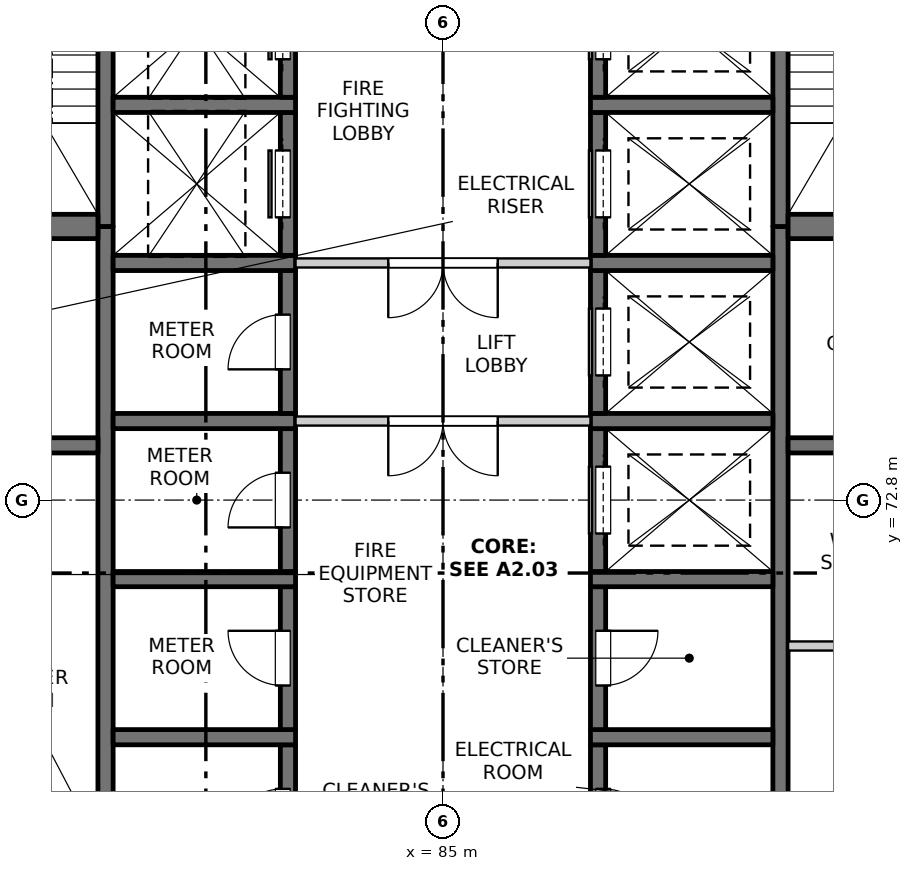
"""IFC4 building model, lengths in metres.
Left out: names, types, materials, properties, quantities, classifications, styles, units other than length and angle.
Written with IfcOpenShell. Run it as: python <this file> out.ifc"""

import sys

from ifc_helpers import new_model, si_unit, direction, frame, frame_2d, origin, place, context, subcontext, project, spatial, rectangle, extrude, element, fill, save


model = new_model("IFC4")
c1 = context("Model", 3, precision=1e-05, world=origin(), true_north=direction((0.0, 1.0)))
c2 = subcontext(c1, "Body", "Model", "MODEL_VIEW")
j1 = project(units=[si_unit("LENGTHUNIT", "METRE"), si_unit("PLANEANGLEUNIT", "RADIAN")], contexts=[c1])
p1 = place(None, origin())
s1 = spatial("IfcSite", under=j1, at=p1, CompositionType="ELEMENT")
p2 = place(p1, origin())
s2 = spatial("IfcBuilding", under=s1, at=p2, CompositionType="ELEMENT")
p3 = place(p2, frame((0.0, 0.0, 210.9)))
s3 = spatial("IfcBuildingStorey", under=s2, at=p3, CompositionType="ELEMENT", Elevation=210.9)
p4 = place(p3, frame((79.45, 60.975, -0.25), z_axis=(0.0, 0.0, 1.0), x_axis=(0.0, 1.0, 0.0)))
e1 = element("IfcWall", 1, at=p4, inside=s3, PredefinedType="SOLIDWALL", context=c2, shape_type="SweptSolid", body=[
    extrude(rectangle(XDim=16.325, YDim=0.25, at=frame_2d((8.163, 0.0))), origin(), (0.0, 0.0, 1.0), 3.4),
])
p5 = place(p3, frame((79.45, 77.3, -0.25), z_axis=(0.0, 0.0, 1.0), x_axis=(0.0, 1.0, 0.0)))
e2 = element("IfcWall", 2, at=p5, inside=s3, PredefinedType="SOLIDWALL", context=c2, shape_type="SweptSolid", body=[
    extrude(rectangle(XDim=7.0, YDim=0.25, at=frame_2d((3.5, 0.0))), origin(), (0.0, 0.0, 1.0), 3.4),
])
p6 = place(p3, frame((90.55, 61.95, -0.25), z_axis=(0.0, 0.0, 1.0), x_axis=(0.0, 1.0, 0.0)))
e3 = element("IfcWall", 3, at=p6, inside=s3, PredefinedType="SOLIDWALL", context=c2, shape_type="SweptSolid", body=[
    extrude(rectangle(XDim=15.35, YDim=0.25, at=frame_2d((7.675, 0.0))), origin(), (0.0, 0.0, 1.0), 3.4),
])
p7 = place(p3, frame((90.55, 77.3, -0.25), z_axis=(0.0, 0.0, 1.0), x_axis=(0.0, 1.0, 0.0)))
e4 = element("IfcWall", 4, at=p7, inside=s3, PredefinedType="SOLIDWALL", context=c2, shape_type="SweptSolid", body=[
    extrude(rectangle(XDim=7.0, YDim=0.25, at=frame_2d((3.5, 0.0))), origin(), (0.0, 0.0, 1.0), 3.4),
])
p8 = place(p3, frame((82.45, 66.425, -0.25), z_axis=(0.0, 0.0, 1.0), x_axis=(0.0, 1.0, 0.0)))
e5 = element("IfcWall", 5, at=p8, inside=s3, PredefinedType="SOLIDWALL", context=c2, shape_type="SweptSolid", body=[
    extrude(rectangle(XDim=2.35, YDim=0.25, at=frame_2d((1.175, 0.0))), origin(), (0.0, 0.0, 1.0), 3.4),
])
p9 = place(p8, frame((0.725, 0.0, 0.25)))
e6 = element("IfcOpeningElement", 6, at=p9, cuts=e5, PredefinedType="OPENING", context=c2, shape_type="SweptSolid", body=[
    extrude(rectangle(XDim=0.9, YDim=2.1, at=frame_2d((0.45, 1.05))), frame((0.0, 0.135, 0.0), z_axis=(0.0, -1.0, 0.0), x_axis=(1.0, 0.0, 0.0)), (0.0, 0.0, 1.0), 0.27),
])
p10 = place(p3, frame((79.575, 68.9, -0.25), z_axis=(0.0, 0.0, 1.0), x_axis=(1.0, 0.0, 0.0)))
e7 = element("IfcWall", 7, at=p10, inside=s3, PredefinedType="SOLIDWALL", context=c2, shape_type="SweptSolid", body=[
    extrude(rectangle(XDim=3.0, YDim=0.25, at=frame_2d((1.5, 0.0))), origin(), (0.0, 0.0, 1.0), 3.4),
])
p11 = place(p3, frame((82.45, 69.025, -0.25), z_axis=(0.0, 0.0, 1.0), x_axis=(0.0, 1.0, 0.0)))
e8 = element("IfcWall", 8, at=p11, inside=s3, PredefinedType="SOLIDWALL", context=c2, shape_type="SweptSolid", body=[
    extrude(rectangle(XDim=2.35, YDim=0.25, at=frame_2d((1.175, 0.0))), origin(), (0.0, 0.0, 1.0), 3.4),
])
p12 = place(p11, frame((0.725, 0.0, 0.25)))
e9 = element("IfcOpeningElement", 9, at=p12, cuts=e8, PredefinedType="OPENING", context=c2, shape_type="SweptSolid", body=[
    extrude(rectangle(XDim=0.9, YDim=2.1, at=frame_2d((0.45, 1.05))), frame((0.0, 0.135, 0.0), z_axis=(0.0, -1.0, 0.0), x_axis=(1.0, 0.0, 0.0)), (0.0, 0.0, 1.0), 0.27),
])
p13 = place(p3, frame((79.575, 71.5, -0.25), z_axis=(0.0, 0.0, 1.0), x_axis=(1.0, 0.0, 0.0)))
e10 = element("IfcWall", 10, at=p13, inside=s3, PredefinedType="SOLIDWALL", context=c2, shape_type="SweptSolid", body=[
    extrude(rectangle(XDim=3.0, YDim=0.25, at=frame_2d((1.5, 0.0))), origin(), (0.0, 0.0, 1.0), 3.4),
])
p14 = place(p3, frame((82.45, 71.625, -0.25), z_axis=(0.0, 0.0, 1.0), x_axis=(0.0, 1.0, 0.0)))
e11 = element("IfcWall", 11, at=p14, inside=s3, PredefinedType="SOLIDWALL", context=c2, shape_type="SweptSolid", body=[
    extrude(rectangle(XDim=2.35, YDim=0.25, at=frame_2d((1.175, 0.0))), origin(), (0.0, 0.0, 1.0), 3.4),
])
p15 = place(p14, frame((0.725, 0.0, 0.25)))
e12 = element("IfcOpeningElement", 12, at=p15, cuts=e11, PredefinedType="OPENING", context=c2, shape_type="SweptSolid", body=[
    extrude(rectangle(XDim=0.9, YDim=2.1, at=frame_2d((0.45, 1.05))), frame((0.0, 0.135, 0.0), z_axis=(0.0, -1.0, 0.0), x_axis=(1.0, 0.0, 0.0)), (0.0, 0.0, 1.0), 0.27),
])
p16 = place(p3, frame((79.575, 74.1, -0.25), z_axis=(0.0, 0.0, 1.0), x_axis=(1.0, 0.0, 0.0)))
e13 = element("IfcWall", 13, at=p16, inside=s3, PredefinedType="SOLIDWALL", context=c2, shape_type="SweptSolid", body=[
    extrude(rectangle(XDim=3.0, YDim=0.25, at=frame_2d((1.5, 0.0))), origin(), (0.0, 0.0, 1.0), 3.4),
])
p17 = place(p3, frame((82.45, 74.225, -0.25), z_axis=(0.0, 0.0, 1.0), x_axis=(0.0, 1.0, 0.0)))
e14 = element("IfcWall", 14, at=p17, inside=s3, PredefinedType="SOLIDWALL", context=c2, shape_type="SweptSolid", body=[
    extrude(rectangle(XDim=2.35, YDim=0.25, at=frame_2d((1.175, 0.0))), origin(), (0.0, 0.0, 1.0), 3.4),
])
p18 = place(p17, frame((0.725, 0.0, 0.25)))
e15 = element("IfcOpeningElement", 15, at=p18, cuts=e14, PredefinedType="OPENING", context=c2, shape_type="SweptSolid", body=[
    extrude(rectangle(XDim=0.9, YDim=2.1, at=frame_2d((0.45, 1.05))), frame((0.0, 0.135, 0.0), z_axis=(0.0, -1.0, 0.0), x_axis=(1.0, 0.0, 0.0)), (0.0, 0.0, 1.0), 0.27),
])
p19 = place(p3, frame((79.575, 76.7, -0.25), z_axis=(0.0, 0.0, 1.0), x_axis=(1.0, 0.0, 0.0)))
e16 = element("IfcWall", 16, at=p19, inside=s3, PredefinedType="SOLIDWALL", context=c2, shape_type="SweptSolid", body=[
    extrude(rectangle(XDim=3.0, YDim=0.25, at=frame_2d((1.5, 0.0))), origin(), (0.0, 0.0, 1.0), 3.4),
])
p20 = place(p3, frame((82.45, 76.825, -0.25), z_axis=(0.0, 0.0, 1.0), x_axis=(0.0, 1.0, 0.0)))
e17 = element("IfcWall", 17, at=p20, inside=s3, PredefinedType="SOLIDWALL", context=c2, shape_type="SweptSolid", body=[
    extrude(rectangle(XDim=2.35, YDim=0.25, at=frame_2d((1.175, 0.0))), origin(), (0.0, 0.0, 1.0), 3.4),
])
p21 = place(p20, frame((0.625, 0.0, 0.25)))
e18 = element("IfcOpeningElement", 18, at=p21, cuts=e17, PredefinedType="OPENING", context=c2, shape_type="SweptSolid", body=[
    extrude(rectangle(XDim=1.1, YDim=2.1, at=frame_2d((0.55, 1.05))), frame((0.0, 0.135, 0.0), z_axis=(0.0, -1.0, 0.0), x_axis=(1.0, 0.0, 0.0)), (0.0, 0.0, 1.0), 0.27),
])
p22 = place(p3, frame((79.575, 79.3, -0.25), z_axis=(0.0, 0.0, 1.0), x_axis=(1.0, 0.0, 0.0)))
e19 = element("IfcWall", 19, at=p22, inside=s3, PredefinedType="SOLIDWALL", context=c2, shape_type="SweptSolid", body=[
    extrude(rectangle(XDim=3.0, YDim=0.25, at=frame_2d((1.5, 0.0))), origin(), (0.0, 0.0, 1.0), 3.4),
])
p23 = place(p3, frame((82.45, 79.425, -0.25), z_axis=(0.0, 0.0, 1.0), x_axis=(0.0, 1.0, 0.0)))
e20 = element("IfcWall", 20, at=p23, inside=s3, PredefinedType="SOLIDWALL", context=c2, shape_type="SweptSolid", body=[
    extrude(rectangle(XDim=2.35, YDim=0.25, at=frame_2d((1.175, 0.0))), origin(), (0.0, 0.0, 1.0), 3.4),
])
p24 = place(p23, frame((0.625, 0.0, 0.25)))
e21 = element("IfcOpeningElement", 21, at=p24, cuts=e20, PredefinedType="OPENING", context=c2, shape_type="SweptSolid", body=[
    extrude(rectangle(XDim=1.1, YDim=2.1, at=frame_2d((0.55, 1.05))), frame((0.0, 0.135, 0.0), z_axis=(0.0, -1.0, 0.0), x_axis=(1.0, 0.0, 0.0)), (0.0, 0.0, 1.0), 0.27),
])
p25 = place(p3, frame((87.55, 66.425, -0.25), z_axis=(0.0, 0.0, 1.0), x_axis=(0.0, 1.0, 0.0)))
e22 = element("IfcWall", 22, at=p25, inside=s3, PredefinedType="SOLIDWALL", context=c2, shape_type="SweptSolid", body=[
    extrude(rectangle(XDim=2.35, YDim=0.25, at=frame_2d((1.175, 0.0))), origin(), (0.0, 0.0, 1.0), 3.4),
])
p26 = place(p25, frame((0.725, 0.0, 0.25)))
e23 = element("IfcOpeningElement", 23, at=p26, cuts=e22, PredefinedType="OPENING", context=c2, shape_type="SweptSolid", body=[
    extrude(rectangle(XDim=0.9, YDim=2.1, at=frame_2d((0.45, 1.05))), frame((0.0, 0.135, 0.0), z_axis=(0.0, -1.0, 0.0), x_axis=(1.0, 0.0, 0.0)), (0.0, 0.0, 1.0), 0.27),
])
p27 = place(p3, frame((87.425, 68.9, -0.25), z_axis=(0.0, 0.0, 1.0), x_axis=(1.0, 0.0, 0.0)))
e24 = element("IfcWall", 24, at=p27, inside=s3, PredefinedType="SOLIDWALL", context=c2, shape_type="SweptSolid", body=[
    extrude(rectangle(XDim=3.0, YDim=0.25, at=frame_2d((1.5, 0.0))), origin(), (0.0, 0.0, 1.0), 3.4),
])
p28 = place(p3, frame((87.55, 69.025, -0.25), z_axis=(0.0, 0.0, 1.0), x_axis=(0.0, 1.0, 0.0)))
e25 = element("IfcWall", 25, at=p28, inside=s3, PredefinedType="SOLIDWALL", context=c2, shape_type="SweptSolid", body=[
    extrude(rectangle(XDim=2.35, YDim=0.25, at=frame_2d((1.175, 0.0))), origin(), (0.0, 0.0, 1.0), 3.4),
])
p29 = place(p28, frame((0.725, 0.0, 0.25)))
e26 = element("IfcOpeningElement", 26, at=p29, cuts=e25, PredefinedType="OPENING", context=c2, shape_type="SweptSolid", body=[
    extrude(rectangle(XDim=0.9, YDim=2.1, at=frame_2d((0.45, 1.05))), frame((0.0, 0.135, 0.0), z_axis=(0.0, -1.0, 0.0), x_axis=(1.0, 0.0, 0.0)), (0.0, 0.0, 1.0), 0.27),
])
p30 = place(p3, frame((87.425, 71.5, -0.25), z_axis=(0.0, 0.0, 1.0), x_axis=(1.0, 0.0, 0.0)))
e27 = element("IfcWall", 27, at=p30, inside=s3, PredefinedType="SOLIDWALL", context=c2, shape_type="SweptSolid", body=[
    extrude(rectangle(XDim=3.0, YDim=0.25, at=frame_2d((1.5, 0.0))), origin(), (0.0, 0.0, 1.0), 3.4),
])
p31 = place(p3, frame((87.55, 71.625, -0.25), z_axis=(0.0, 0.0, 1.0), x_axis=(0.0, 1.0, 0.0)))
e28 = element("IfcWall", 28, at=p31, inside=s3, PredefinedType="SOLIDWALL", context=c2, shape_type="SweptSolid", body=[
    extrude(rectangle(XDim=2.35, YDim=0.25, at=frame_2d((1.175, 0.0))), origin(), (0.0, 0.0, 1.0), 3.4),
])
p32 = place(p31, frame((0.625, 0.0, 0.25)))
e29 = element("IfcOpeningElement", 29, at=p32, cuts=e28, PredefinedType="OPENING", context=c2, shape_type="SweptSolid", body=[
    extrude(rectangle(XDim=1.1, YDim=2.1, at=frame_2d((0.55, 1.05))), frame((0.0, 0.135, 0.0), z_axis=(0.0, -1.0, 0.0), x_axis=(1.0, 0.0, 0.0)), (0.0, 0.0, 1.0), 0.27),
])
p33 = place(p3, frame((87.425, 74.1, -0.25), z_axis=(0.0, 0.0, 1.0), x_axis=(1.0, 0.0, 0.0)))
e30 = element("IfcWall", 30, at=p33, inside=s3, PredefinedType="SOLIDWALL", context=c2, shape_type="SweptSolid", body=[
    extrude(rectangle(XDim=3.0, YDim=0.25, at=frame_2d((1.5, 0.0))), origin(), (0.0, 0.0, 1.0), 3.4),
])
p34 = place(p3, frame((87.55, 74.225, -0.25), z_axis=(0.0, 0.0, 1.0), x_axis=(0.0, 1.0, 0.0)))
e31 = element("IfcWall", 31, at=p34, inside=s3, PredefinedType="SOLIDWALL", context=c2, shape_type="SweptSolid", body=[
    extrude(rectangle(XDim=2.35, YDim=0.25, at=frame_2d((1.175, 0.0))), origin(), (0.0, 0.0, 1.0), 3.4),
])
p35 = place(p34, frame((0.625, 0.0, 0.25)))
e32 = element("IfcOpeningElement", 32, at=p35, cuts=e31, PredefinedType="OPENING", context=c2, shape_type="SweptSolid", body=[
    extrude(rectangle(XDim=1.1, YDim=2.1, at=frame_2d((0.55, 1.05))), frame((0.0, 0.135, 0.0), z_axis=(0.0, -1.0, 0.0), x_axis=(1.0, 0.0, 0.0)), (0.0, 0.0, 1.0), 0.27),
])
p36 = place(p3, frame((87.425, 76.7, -0.25), z_axis=(0.0, 0.0, 1.0), x_axis=(1.0, 0.0, 0.0)))
e33 = element("IfcWall", 33, at=p36, inside=s3, PredefinedType="SOLIDWALL", context=c2, shape_type="SweptSolid", body=[
    extrude(rectangle(XDim=3.0, YDim=0.25, at=frame_2d((1.5, 0.0))), origin(), (0.0, 0.0, 1.0), 3.4),
])
p37 = place(p3, frame((87.55, 76.825, -0.25), z_axis=(0.0, 0.0, 1.0), x_axis=(0.0, 1.0, 0.0)))
e34 = element("IfcWall", 34, at=p37, inside=s3, PredefinedType="SOLIDWALL", context=c2, shape_type="SweptSolid", body=[
    extrude(rectangle(XDim=2.35, YDim=0.25, at=frame_2d((1.175, 0.0))), origin(), (0.0, 0.0, 1.0), 3.4),
])
p38 = place(p37, frame((0.625, 0.0, 0.25)))
e35 = element("IfcOpeningElement", 35, at=p38, cuts=e34, PredefinedType="OPENING", context=c2, shape_type="SweptSolid", body=[
    extrude(rectangle(XDim=1.1, YDim=2.1, at=frame_2d((0.55, 1.05))), frame((0.0, 0.135, 0.0), z_axis=(0.0, -1.0, 0.0), x_axis=(1.0, 0.0, 0.0)), (0.0, 0.0, 1.0), 0.27),
])
p39 = place(p3, frame((87.425, 79.3, -0.25), z_axis=(0.0, 0.0, 1.0), x_axis=(1.0, 0.0, 0.0)))
e36 = element("IfcWall", 36, at=p39, inside=s3, PredefinedType="SOLIDWALL", context=c2, shape_type="SweptSolid", body=[
    extrude(rectangle(XDim=3.0, YDim=0.25, at=frame_2d((1.5, 0.0))), origin(), (0.0, 0.0, 1.0), 3.4),
])
p40 = place(p3, frame((87.55, 79.425, -0.25), z_axis=(0.0, 0.0, 1.0), x_axis=(0.0, 1.0, 0.0)))
e37 = element("IfcWall", 37, at=p40, inside=s3, PredefinedType="SOLIDWALL", context=c2, shape_type="SweptSolid", body=[
    extrude(rectangle(XDim=2.35, YDim=0.25, at=frame_2d((1.175, 0.0))), origin(), (0.0, 0.0, 1.0), 3.4),
])
p41 = place(p40, frame((0.625, 0.0, 0.25)))
e38 = element("IfcOpeningElement", 38, at=p41, cuts=e37, PredefinedType="OPENING", context=c2, shape_type="SweptSolid", body=[
    extrude(rectangle(XDim=1.1, YDim=2.1, at=frame_2d((0.55, 1.05))), frame((0.0, 0.135, 0.0), z_axis=(0.0, -1.0, 0.0), x_axis=(1.0, 0.0, 0.0)), (0.0, 0.0, 1.0), 0.27),
])
p42 = place(p3, frame((75.45, 73.7, -0.25), z_axis=(0.0, 0.0, 1.0), x_axis=(1.0, 0.0, 0.0)))
e39 = element("IfcWall", 39, at=p42, inside=s3, PredefinedType="SOLIDWALL", context=c2, shape_type="SweptSolid", body=[
    extrude(rectangle(XDim=3.875, YDim=0.25, at=frame_2d((1.938, 0.0))), origin(), (0.0, 0.0, 1.0), 3.4),
])
p43 = place(p3, frame((75.45, 77.3, -0.25), z_axis=(0.0, 0.0, 1.0), x_axis=(1.0, 0.0, 0.0)))
e40 = element("IfcWall", 40, at=p43, inside=s3, PredefinedType="SOLIDWALL", context=c2, shape_type="SweptSolid", body=[
    extrude(rectangle(XDim=3.875, YDim=0.4, at=frame_2d((1.938, 0.0))), origin(), (0.0, 0.0, 1.0), 3.4),
])
p44 = place(p3, frame((90.675, 73.7, -0.25), z_axis=(0.0, 0.0, 1.0), x_axis=(1.0, 0.0, 0.0)))
e41 = element("IfcWall", 41, at=p44, inside=s3, PredefinedType="SOLIDWALL", context=c2, shape_type="SweptSolid", body=[
    extrude(rectangle(XDim=3.875, YDim=0.25, at=frame_2d((1.938, 0.0))), origin(), (0.0, 0.0, 1.0), 3.4),
])
p45 = place(p3, frame((90.675, 77.3, -0.25), z_axis=(0.0, 0.0, 1.0), x_axis=(1.0, 0.0, 0.0)))
e42 = element("IfcWall", 42, at=p45, inside=s3, PredefinedType="SOLIDWALL", context=c2, shape_type="SweptSolid", body=[
    extrude(rectangle(XDim=3.875, YDim=0.4, at=frame_2d((1.938, 0.0))), origin(), (0.0, 0.0, 1.0), 3.4),
])
p46 = place(p3, frame((90.675, 70.4, 0.0), z_axis=(0.0, 0.0, 1.0), x_axis=(1.0, 0.0, 0.0)))
e43 = element("IfcWall", 43, at=p46, inside=s3, PredefinedType="PARTITIONING", context=c2, shape_type="SweptSolid", body=[
    extrude(rectangle(XDim=3.875, YDim=0.15, at=frame_2d((1.938, 0.0))), origin(), (0.0, 0.0, 1.0), 3.15),
])
p47 = place(p3, frame((82.575, 74.1, 0.0), z_axis=(0.0, 0.0, 1.0), x_axis=(1.0, 0.0, 0.0)))
e44 = element("IfcWall", 44, at=p47, inside=s3, PredefinedType="PARTITIONING", context=c2, shape_type="SweptSolid", body=[
    extrude(rectangle(XDim=4.85, YDim=0.15, at=frame_2d((2.425, 0.0))), origin(), (0.0, 0.0, 1.0), 3.15),
])
p48 = place(p47, frame((1.525, 0.0, 0.0)))
e45 = element("IfcOpeningElement", 45, at=p48, cuts=e44, PredefinedType="OPENING", context=c2, shape_type="SweptSolid", body=[
    extrude(rectangle(XDim=1.8, YDim=2.1, at=frame_2d((0.9, 1.05))), frame((0.0, 0.085, 0.0), z_axis=(0.0, -1.0, 0.0), x_axis=(1.0, 0.0, 0.0)), (0.0, 0.0, 1.0), 0.17),
])
p49 = place(p3, frame((82.575, 76.7, 0.0), z_axis=(0.0, 0.0, 1.0), x_axis=(1.0, 0.0, 0.0)))
e46 = element("IfcWall", 46, at=p49, inside=s3, PredefinedType="PARTITIONING", context=c2, shape_type="SweptSolid", body=[
    extrude(rectangle(XDim=4.85, YDim=0.15, at=frame_2d((2.425, 0.0))), origin(), (0.0, 0.0, 1.0), 3.15),
])
p50 = place(p49, frame((1.525, 0.0, 0.0)))
e47 = element("IfcOpeningElement", 47, at=p50, cuts=e46, PredefinedType="OPENING", context=c2, shape_type="SweptSolid", body=[
    extrude(rectangle(XDim=1.8, YDim=2.1, at=frame_2d((0.9, 1.05))), frame((0.0, 0.085, 0.0), z_axis=(0.0, -1.0, 0.0), x_axis=(1.0, 0.0, 0.0)), (0.0, 0.0, 1.0), 0.17),
])
p51 = place(p9, origin())
e48 = element("IfcDoor", 48, at=p51, inside=s3, OperationType="SINGLE_SWING_LEFT", PredefinedType="DOOR", context=c2, shape_type="SweptSolid", body=[
    extrude(rectangle(XDim=0.9, YDim=2.1, at=frame_2d((0.45, 1.05))), frame((0.0, 0.11, 0.0), z_axis=(0.0, -1.0, 0.0), x_axis=(1.0, 0.0, 0.0)), (0.0, 0.0, 1.0), 0.05),
])
fill(e6, e48)
p52 = place(p26, origin())
e49 = element("IfcDoor", 49, at=p52, inside=s3, OperationType="SINGLE_SWING_RIGHT", PredefinedType="DOOR", context=c2, shape_type="SweptSolid", body=[
    extrude(rectangle(XDim=0.9, YDim=2.1, at=frame_2d((0.45, 1.05))), frame((0.0, -0.06, 0.0), z_axis=(0.0, -1.0, 0.0), x_axis=(1.0, 0.0, 0.0)), (0.0, 0.0, 1.0), 0.05),
])
fill(e23, e49)
p53 = place(p12, origin())
e50 = element("IfcDoor", 50, at=p53, inside=s3, OperationType="SINGLE_SWING_RIGHT", PredefinedType="DOOR", context=c2, shape_type="SweptSolid", body=[
    extrude(rectangle(XDim=0.9, YDim=2.1, at=frame_2d((0.45, 1.05))), frame((0.0, 0.11, 0.0), z_axis=(0.0, -1.0, 0.0), x_axis=(1.0, 0.0, 0.0)), (0.0, 0.0, 1.0), 0.05),
])
fill(e9, e50)
p54 = place(p29, origin())
e51 = element("IfcDoor", 51, at=p54, inside=s3, OperationType="SINGLE_SWING_LEFT", PredefinedType="DOOR", context=c2, shape_type="SweptSolid", body=[
    extrude(rectangle(XDim=0.9, YDim=2.1, at=frame_2d((0.45, 1.05))), frame((0.0, -0.06, 0.0), z_axis=(0.0, -1.0, 0.0), x_axis=(1.0, 0.0, 0.0)), (0.0, 0.0, 1.0), 0.05),
])
fill(e26, e51)
p55 = place(p15, origin())
e52 = element("IfcDoor", 52, at=p55, inside=s3, OperationType="SINGLE_SWING_LEFT", PredefinedType="DOOR", context=c2, shape_type="SweptSolid", body=[
    extrude(rectangle(XDim=0.9, YDim=2.1, at=frame_2d((0.45, 1.05))), frame((0.0, 0.11, 0.0), z_axis=(0.0, -1.0, 0.0), x_axis=(1.0, 0.0, 0.0)), (0.0, 0.0, 1.0), 0.05),
])
fill(e12, e52)
p56 = place(p32, origin())
e53 = element("IfcDoor", 53, at=p56, inside=s3, OperationType="SLIDING_TO_LEFT", PredefinedType="DOOR", context=c2, shape_type="SweptSolid", body=[
    extrude(rectangle(XDim=1.1, YDim=2.1, at=frame_2d((0.55, 1.05))), frame((0.0, -0.06, 0.0), z_axis=(0.0, -1.0, 0.0), x_axis=(1.0, 0.0, 0.0)), (0.0, 0.0, 1.0), 0.05),
])
fill(e29, e53)
p57 = place(p48, origin())
e54 = element("IfcDoor", 54, at=p57, inside=s3, OperationType="DOUBLE_DOOR_SINGLE_SWING", PredefinedType="DOOR", context=c2, shape_type="SweptSolid", body=[
    extrude(rectangle(XDim=1.8, YDim=2.1, at=frame_2d((0.9, 1.05))), frame((0.0, 0.025, 0.0), z_axis=(0.0, -1.0, 0.0), x_axis=(1.0, 0.0, 0.0)), (0.0, 0.0, 1.0), 0.05),
])
fill(e45, e54)
p58 = place(p18, origin())
e55 = element("IfcDoor", 55, at=p58, inside=s3, OperationType="SINGLE_SWING_LEFT", PredefinedType="DOOR", context=c2, shape_type="SweptSolid", body=[
    extrude(rectangle(XDim=0.9, YDim=2.1, at=frame_2d((0.45, 1.05))), frame((0.0, 0.11, 0.0), z_axis=(0.0, -1.0, 0.0), x_axis=(1.0, 0.0, 0.0)), (0.0, 0.0, 1.0), 0.05),
])
fill(e15, e55)
p59 = place(p35, origin())
e56 = element("IfcDoor", 56, at=p59, inside=s3, OperationType="SLIDING_TO_LEFT", PredefinedType="DOOR", context=c2, shape_type="SweptSolid", body=[
    extrude(rectangle(XDim=1.1, YDim=2.1, at=frame_2d((0.55, 1.05))), frame((0.0, -0.06, 0.0), z_axis=(0.0, -1.0, 0.0), x_axis=(1.0, 0.0, 0.0)), (0.0, 0.0, 1.0), 0.05),
])
fill(e32, e56)
p60 = place(p50, origin())
e57 = element("IfcDoor", 57, at=p60, inside=s3, OperationType="DOUBLE_DOOR_SINGLE_SWING", PredefinedType="DOOR", context=c2, shape_type="SweptSolid", body=[
    extrude(rectangle(XDim=1.8, YDim=2.1, at=frame_2d((0.9, 1.05))), frame((0.0, 0.025, 0.0), z_axis=(0.0, -1.0, 0.0), x_axis=(1.0, 0.0, 0.0)), (0.0, 0.0, 1.0), 0.05),
])
fill(e47, e57)
p61 = place(p21, origin())
e58 = element("IfcDoor", 58, at=p61, inside=s3, OperationType="SLIDING_TO_LEFT", PredefinedType="DOOR", context=c2, shape_type="SweptSolid", body=[
    extrude(rectangle(XDim=1.1, YDim=2.1, at=frame_2d((0.55, 1.05))), frame((0.0, 0.11, 0.0), z_axis=(0.0, -1.0, 0.0), x_axis=(1.0, 0.0, 0.0)), (0.0, 0.0, 1.0), 0.05),
])
fill(e18, e58)
p62 = place(p38, origin())
e59 = element("IfcDoor", 59, at=p62, inside=s3, OperationType="SLIDING_TO_LEFT", PredefinedType="DOOR", context=c2, shape_type="SweptSolid", body=[
    extrude(rectangle(XDim=1.1, YDim=2.1, at=frame_2d((0.55, 1.05))), frame((0.0, -0.06, 0.0), z_axis=(0.0, -1.0, 0.0), x_axis=(1.0, 0.0, 0.0)), (0.0, 0.0, 1.0), 0.05),
])
fill(e35, e59)
p63 = place(p24, origin())
e60 = element("IfcDoor", 60, at=p63, inside=s3, OperationType="SLIDING_TO_LEFT", PredefinedType="DOOR", context=c2, shape_type="SweptSolid", body=[
    extrude(rectangle(XDim=1.1, YDim=2.1, at=frame_2d((0.55, 1.05))), frame((0.0, 0.11, 0.0), z_axis=(0.0, -1.0, 0.0), x_axis=(1.0, 0.0, 0.0)), (0.0, 0.0, 1.0), 0.05),
])
fill(e21, e60)
p64 = place(p41, origin())
e61 = element("IfcDoor", 61, at=p64, inside=s3, OperationType="SLIDING_TO_RIGHT", PredefinedType="DOOR", context=c2, shape_type="SweptSolid", body=[
    extrude(rectangle(XDim=1.1, YDim=2.1, at=frame_2d((0.55, 1.05))), frame((0.0, -0.06, 0.0), z_axis=(0.0, -1.0, 0.0), x_axis=(1.0, 0.0, 0.0)), (0.0, 0.0, 1.0), 0.05),
])
fill(e38, e61)
save(model, sys.argv[1])
